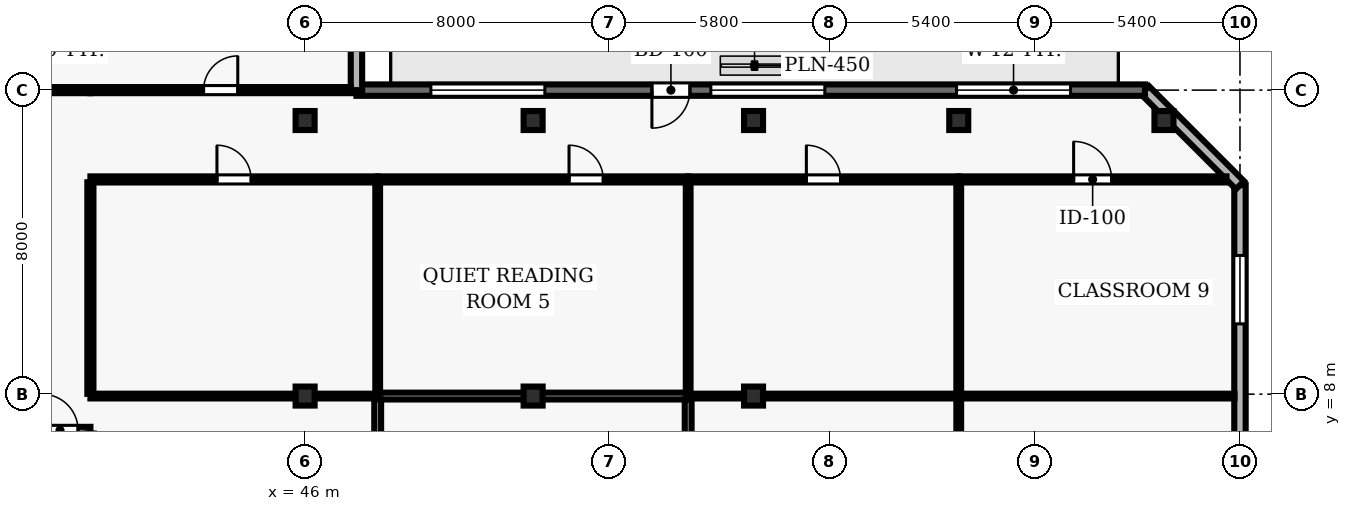
"""IFC4 building model, lengths in metres.
Left out: names, types, materials, properties, quantities, classifications, styles, units other than length and angle.
Written with IfcOpenShell. Run it as: python <this file> out.ifc"""

import sys

from ifc_helpers import new_model, si_unit, direction, frame, frame_2d, origin, origin_2d, place, context, subcontext, project, spatial, rectangle, hollow_rectangle, extrude, element, fill, save


model = new_model("IFC4")
c1 = context("Model", 3, precision=1e-05, world=origin(), true_north=direction((0.0, 1.0)))
c2 = subcontext(c1, "Body", "Model", "MODEL_VIEW")
j1 = project(units=[si_unit("LENGTHUNIT", "METRE"), si_unit("PLANEANGLEUNIT", "RADIAN")], contexts=[c1])
p1 = place(None, origin())
s1 = spatial("IfcSite", under=j1, at=p1, CompositionType="ELEMENT")
p2 = place(p1, origin())
s2 = spatial("IfcBuilding", under=s1, at=p2, CompositionType="ELEMENT")
p3 = place(p2, frame((0.0, 0.0, 130.7)))
s3 = spatial("IfcBuildingStorey", under=s2, at=p3, CompositionType="ELEMENT", Elevation=130.7)
for number, where, z_axis, x_axis in (
    (1, (46.0, 7.95, 0.0), (0.0, 0.0, 1.0), (1.0, 0.0, 0.0)),
    (2, (46.0, 15.2, 0.0), (0.0, 0.0, 1.0), (1.0, 0.0, 0.0)),
    (3, (52.0, 7.95, 0.0), (0.0, 0.0, 1.0), (1.0, 0.0, 0.0)),
    (4, (52.0, 15.2, 0.0), (0.0, 0.0, 1.0), (1.0, 0.0, 0.0)),
    (5, (57.8, 7.95, 0.0), (0.0, 0.0, 1.0), (1.0, 0.0, 0.0)),
    (6, (57.8, 15.2, 0.0), (0.0, 0.0, 1.0), (1.0, 0.0, 0.0)),
    (7, (63.2, 15.2, 0.0), (0.0, 0.0, 1.0), (1.0, 0.0, 0.0)),
    (8, (68.6, 15.2, 0.0), (0.0, 0.0, 1.0), (1.0, 0.0, 0.0)),
):
    element("IfcColumn", number, at=place(p3, frame(where, z_axis=z_axis, x_axis=x_axis)), inside=s3, PredefinedType="COLUMN", context=c2, shape_type="SweptSolid", body=[
        extrude(hollow_rectangle(XDim=0.5, YDim=0.5, WallThickness=0.025, at=origin_2d()), origin(), (0.0, 0.0, 1.0), 3.9),
    ])
p4 = place(p3, frame((70.6, 2.5, 0.0), z_axis=(0.0, 0.0, 1.0), x_axis=(0.0, 1.0, 0.0)))
e9 = element("IfcWall", 9, at=p4, inside=s3, PredefinedType="SOLIDWALL", context=c2, shape_type="SweptSolid", body=[
    extrude(rectangle(XDim=11.0, YDim=0.3, at=frame_2d((5.5, 0.0))), origin(), (0.0, 0.0, 1.0), 3.69),
])
p5 = place(p4, frame((1.85, 0.0, 0.9)))
e10 = element("IfcOpeningElement", 10, at=p5, cuts=e9, PredefinedType="OPENING", context=c2, shape_type="SweptSolid", body=[
    extrude(rectangle(XDim=1.8, YDim=2.2, at=frame_2d((0.9, 1.1))), frame((0.0, 0.16, 0.0), z_axis=(0.0, -1.0, 0.0), x_axis=(1.0, 0.0, 0.0)), (0.0, 0.0, 1.0), 0.32),
])
p6 = place(p4, frame((7.35, 0.0, 0.9)))
e11 = element("IfcOpeningElement", 11, at=p6, cuts=e9, PredefinedType="OPENING", context=c2, shape_type="SweptSolid", body=[
    extrude(rectangle(XDim=1.8, YDim=2.2, at=frame_2d((0.9, 1.1))), frame((0.0, 0.16, 0.0), z_axis=(0.0, -1.0, 0.0), x_axis=(1.0, 0.0, 0.0)), (0.0, 0.0, 1.0), 0.32),
])
p7 = place(p3, frame((70.6, 13.5, 0.0), z_axis=(0.0, 0.0, 1.0), x_axis=(-0.707106781187, 0.707106781187, 0.0)))
e12 = element("IfcWall", 12, at=p7, inside=s3, PredefinedType="SOLIDWALL", context=c2, shape_type="SweptSolid", body=[
    extrude(rectangle(XDim=3.536, YDim=0.3, at=frame_2d((1.768, 0.0))), origin(), (0.0, 0.0, 1.0), 3.69),
])
p8 = place(p3, frame((68.1, 16.0, 0.0), z_axis=(0.0, 0.0, 1.0), x_axis=(-1.0, 0.0, 0.0)))
e13 = element("IfcWall", 13, at=p8, inside=s3, PredefinedType="SOLIDWALL", context=c2, shape_type="SweptSolid", body=[
    extrude(rectangle(XDim=20.749, YDim=0.3, at=frame_2d((10.375, 0.0))), origin(), (0.0, 0.0, 1.0), 3.69),
])
p9 = place(p8, frame((11.974, 0.0, 0.0)))
e14 = element("IfcOpeningElement", 14, at=p9, cuts=e13, PredefinedType="OPENING", context=c2, shape_type="SweptSolid", body=[
    extrude(rectangle(XDim=1.0, YDim=2.2, at=frame_2d((0.5, 1.1))), frame((0.0, 0.16, 0.0), z_axis=(0.0, -1.0, 0.0), x_axis=(1.0, 0.0, 0.0)), (0.0, 0.0, 1.0), 0.32),
])
p10 = place(p8, frame((1.958, 0.0, 0.9)))
e15 = element("IfcOpeningElement", 15, at=p10, cuts=e13, PredefinedType="OPENING", context=c2, shape_type="SweptSolid", body=[
    extrude(rectangle(XDim=3.0, YDim=2.2, at=frame_2d((1.5, 1.1))), frame((0.0, 0.16, 0.0), z_axis=(0.0, -1.0, 0.0), x_axis=(1.0, 0.0, 0.0)), (0.0, 0.0, 1.0), 0.32),
])
p11 = place(p8, frame((8.424, 0.0, 0.9)))
e16 = element("IfcOpeningElement", 16, at=p11, cuts=e13, PredefinedType="OPENING", context=c2, shape_type="SweptSolid", body=[
    extrude(rectangle(XDim=3.0, YDim=2.2, at=frame_2d((1.5, 1.1))), frame((0.0, 0.16, 0.0), z_axis=(0.0, -1.0, 0.0), x_axis=(1.0, 0.0, 0.0)), (0.0, 0.0, 1.0), 0.32),
])
p12 = place(p8, frame((15.791, 0.0, 0.9)))
e17 = element("IfcOpeningElement", 17, at=p12, cuts=e13, PredefinedType="OPENING", context=c2, shape_type="SweptSolid", body=[
    extrude(rectangle(XDim=3.0, YDim=2.2, at=frame_2d((1.5, 1.1))), frame((0.0, 0.16, 0.0), z_axis=(0.0, -1.0, 0.0), x_axis=(1.0, 0.0, 0.0)), (0.0, 0.0, 1.0), 0.32),
])
p13 = place(p3, frame((47.351, 16.0, 0.0), z_axis=(0.0, 0.0, 1.0), x_axis=(0.0, 1.0, 0.0)))
e18 = element("IfcWall", 18, at=p13, inside=s3, PredefinedType="SOLIDWALL", context=c2, shape_type="SweptSolid", body=[
    extrude(rectangle(XDim=10.7, YDim=0.3, at=frame_2d((5.35, 0.0))), origin(), (0.0, 0.0, 1.0), 3.69),
])
p14 = place(p13, frame((4.75, 0.0, 0.9)))
e19 = element("IfcOpeningElement", 19, at=p14, cuts=e18, PredefinedType="OPENING", context=c2, shape_type="SweptSolid", body=[
    extrude(rectangle(XDim=1.2, YDim=1.6, at=frame_2d((0.6, 0.8))), frame((0.0, 0.16, 0.0), z_axis=(0.0, -1.0, 0.0), x_axis=(1.0, 0.0, 0.0)), (0.0, 0.0, 1.0), 0.32),
])
p15 = place(p3, frame((38.05, 7.05, 0.0), z_axis=(0.0, 0.0, 1.0), x_axis=(1.0, 0.0, 0.0)))
e20 = element("IfcWall", 20, at=p15, inside=s3, PredefinedType="PARTITIONING", context=c2, shape_type="SweptSolid", body=[
    extrude(rectangle(XDim=2.3, YDim=0.18, at=frame_2d((1.15, 0.0))), origin(), (0.0, 0.0, 1.0), 3.69),
])
p16 = place(p15, frame((1.025, 0.0, 0.0)))
e21 = element("IfcOpeningElement", 21, at=p16, cuts=e20, PredefinedType="OPENING", context=c2, shape_type="SweptSolid", body=[
    extrude(rectangle(XDim=0.95, YDim=2.1, at=frame_2d((0.475, 1.05))), frame((0.0, 0.1, 0.0), z_axis=(0.0, -1.0, 0.0), x_axis=(1.0, 0.0, 0.0)), (0.0, 0.0, 1.0), 0.2),
])
p17 = place(p3, frame((40.35, 13.65, 0.0), z_axis=(0.0, 0.0, 1.0), x_axis=(1.0, 0.0, 0.0)))
e22 = element("IfcWall", 22, at=p17, inside=s3, PredefinedType="PARTITIONING", context=c2, shape_type="SweptSolid", body=[
    extrude(rectangle(XDim=7.56, YDim=0.16, at=frame_2d((3.78, 0.0))), origin(), (0.0, 0.0, 1.0), 3.69),
])
p18 = place(p17, frame((3.33, 0.0, 0.0)))
e23 = element("IfcOpeningElement", 23, at=p18, cuts=e22, PredefinedType="OPENING", context=c2, shape_type="SweptSolid", body=[
    extrude(rectangle(XDim=0.9, YDim=2.1, at=frame_2d((0.45, 1.05))), frame((0.0, 0.09, 0.0), z_axis=(0.0, -1.0, 0.0), x_axis=(1.0, 0.0, 0.0)), (0.0, 0.0, 1.0), 0.18),
])
p19 = place(p3, frame((40.35, 16.0, 0.0), z_axis=(0.0, 0.0, 1.0), x_axis=(-1.0, 0.0, 0.0)))
e24 = element("IfcWall", 24, at=p19, inside=s3, PredefinedType="PARTITIONING", context=c2, shape_type="SweptSolid", body=[
    extrude(rectangle(XDim=2.3, YDim=0.16, at=frame_2d((1.15, 0.0))), origin(), (0.0, 0.0, 1.0), 3.69),
])
p20 = place(p3, frame((40.35, 16.0, 0.0), z_axis=(0.0, 0.0, 1.0), x_axis=(1.0, 0.0, 0.0)))
e25 = element("IfcWall", 25, at=p20, inside=s3, PredefinedType="PARTITIONING", context=c2, shape_type="SweptSolid", body=[
    extrude(rectangle(XDim=6.856, YDim=0.16, at=frame_2d((3.428, 0.0))), origin(), (0.0, 0.0, 1.0), 3.39),
])
p21 = place(p20, frame((2.978, 0.0, 0.0)))
e26 = element("IfcOpeningElement", 26, at=p21, cuts=e25, PredefinedType="OPENING", context=c2, shape_type="SweptSolid", body=[
    extrude(rectangle(XDim=0.9, YDim=2.1, at=frame_2d((0.45, 1.05))), frame((0.0, 0.09, 0.0), z_axis=(0.0, -1.0, 0.0), x_axis=(1.0, 0.0, 0.0)), (0.0, 0.0, 1.0), 0.18),
])
p22 = place(p3, frame((47.91, 7.95, 0.0), z_axis=(0.0, 0.0, 1.0), x_axis=(-1.0, 0.0, 0.0)))
e27 = element("IfcWall", 27, at=p22, inside=s3, PredefinedType="PARTITIONING", context=c2, shape_type="SweptSolid", body=[
    extrude(rectangle(XDim=7.56, YDim=0.125, at=frame_2d((3.78, 0.0))), origin(), (0.0, 0.0, 1.0), 3.073),
])
p23 = place(p3, frame((47.91, 13.65, 0.0), z_axis=(0.0, 0.0, 1.0), x_axis=(1.0, 0.0, 0.0)))
e28 = element("IfcWall", 28, at=p23, inside=s3, PredefinedType="PARTITIONING", context=c2, shape_type="SweptSolid", body=[
    extrude(rectangle(XDim=8.17, YDim=0.16, at=frame_2d((4.085, 0.0))), origin(), (0.0, 0.0, 1.0), 3.69),
])
p24 = place(p23, frame((5.035, 0.0, 0.0)))
e29 = element("IfcOpeningElement", 29, at=p24, cuts=e28, PredefinedType="OPENING", context=c2, shape_type="SweptSolid", body=[
    extrude(rectangle(XDim=0.9, YDim=2.1, at=frame_2d((0.45, 1.05))), frame((0.0, 0.09, 0.0), z_axis=(0.0, -1.0, 0.0), x_axis=(1.0, 0.0, 0.0)), (0.0, 0.0, 1.0), 0.18),
])
p25 = place(p3, frame((56.08, 7.95, 0.0), z_axis=(0.0, 0.0, 1.0), x_axis=(-1.0, 0.0, 0.0)))
e30 = element("IfcWall", 30, at=p25, inside=s3, PredefinedType="PARTITIONING", context=c2, shape_type="SweptSolid", body=[
    extrude(rectangle(XDim=8.17, YDim=0.18, at=frame_2d((4.085, 0.0))), origin(), (0.0, 0.0, 1.0), 3.073),
])
p26 = place(p3, frame((56.08, 13.65, 0.0), z_axis=(0.0, 0.0, 1.0), x_axis=(1.0, 0.0, 0.0)))
e31 = element("IfcWall", 31, at=p26, inside=s3, PredefinedType="PARTITIONING", context=c2, shape_type="SweptSolid", body=[
    extrude(rectangle(XDim=7.12, YDim=0.16, at=frame_2d((3.56, 0.0))), origin(), (0.0, 0.0, 1.0), 3.69),
])
p27 = place(p26, frame((3.11, 0.0, 0.0)))
e32 = element("IfcOpeningElement", 32, at=p27, cuts=e31, PredefinedType="OPENING", context=c2, shape_type="SweptSolid", body=[
    extrude(rectangle(XDim=0.9, YDim=2.1, at=frame_2d((0.45, 1.05))), frame((0.0, 0.09, 0.0), z_axis=(0.0, -1.0, 0.0), x_axis=(1.0, 0.0, 0.0)), (0.0, 0.0, 1.0), 0.18),
])
p28 = place(p3, frame((63.2, 7.95, 0.0), z_axis=(0.0, 0.0, 1.0), x_axis=(-1.0, 0.0, 0.0)))
e33 = element("IfcWall", 33, at=p28, inside=s3, PredefinedType="PARTITIONING", context=c2, shape_type="SweptSolid", body=[
    extrude(rectangle(XDim=7.12, YDim=0.125, at=frame_2d((3.56, 0.0))), origin(), (0.0, 0.0, 1.0), 3.073),
])
p29 = place(p3, frame((63.2, 13.65, 0.0), z_axis=(0.0, 0.0, 1.0), x_axis=(1.0, 0.0, 0.0)))
e34 = element("IfcWall", 34, at=p29, inside=s3, PredefinedType="PARTITIONING", context=c2, shape_type="SweptSolid", body=[
    extrude(rectangle(XDim=7.045, YDim=0.16, at=frame_2d((3.522, 0.0))), origin(), (0.0, 0.0, 1.0), 3.69),
])
p30 = place(p29, frame((3.023, 0.0, 0.0)))
e35 = element("IfcOpeningElement", 35, at=p30, cuts=e34, PredefinedType="OPENING", context=c2, shape_type="SweptSolid", body=[
    extrude(rectangle(XDim=1.0, YDim=2.1, at=frame_2d((0.5, 1.05))), frame((0.0, 0.09, 0.0), z_axis=(0.0, -1.0, 0.0), x_axis=(1.0, 0.0, 0.0)), (0.0, 0.0, 1.0), 0.18),
])
p31 = place(p3, frame((70.455, 7.95, 0.0), z_axis=(0.0, 0.0, 1.0), x_axis=(-1.0, 0.0, 0.0)))
e36 = element("IfcWall", 36, at=p31, inside=s3, PredefinedType="PARTITIONING", context=c2, shape_type="SweptSolid", body=[
    extrude(rectangle(XDim=7.255, YDim=0.125, at=frame_2d((3.627, 0.0))), origin(), (0.0, 0.0, 1.0), 3.69),
])
p32 = place(p3, frame((40.35, 8.008, 0.0), z_axis=(0.0, 0.0, 1.0), x_axis=(0.0, 1.0, 0.0)))
e37 = element("IfcWall", 37, at=p32, inside=s3, PredefinedType="PARTITIONING", context=c2, shape_type="SweptSolid", body=[
    extrude(rectangle(XDim=5.567, YDim=0.16, at=frame_2d((2.783, 0.0))), origin(), (0.0, 0.0, 1.0), 3.69),
])
p33 = place(p3, frame((47.91, 0.145, 0.0), z_axis=(0.0, 0.0, 1.0), x_axis=(0.0, 1.0, 0.0)))
e38 = element("IfcWall", 38, at=p33, inside=s3, PredefinedType="PARTITIONING", context=c2, shape_type="SweptSolid", body=[
    extrude(rectangle(XDim=7.72, YDim=0.18, at=frame_2d((3.86, 0.0))), origin(), (0.0, 0.0, 1.0), 3.69),
])
p34 = place(p33, frame((3.385, 0.0, 0.0)))
e39 = element("IfcOpeningElement", 39, at=p34, cuts=e38, PredefinedType="OPENING", context=c2, shape_type="SweptSolid", body=[
    extrude(rectangle(XDim=0.95, YDim=2.1, at=frame_2d((0.475, 1.05))), frame((0.0, 0.1, 0.0), z_axis=(0.0, -1.0, 0.0), x_axis=(1.0, 0.0, 0.0)), (0.0, 0.0, 1.0), 0.2),
])
p35 = place(p3, frame((47.91, 8.035, 0.0), z_axis=(0.0, 0.0, 1.0), x_axis=(0.0, 1.0, 0.0)))
e40 = element("IfcWall", 40, at=p35, inside=s3, PredefinedType="PARTITIONING", context=c2, shape_type="SweptSolid", body=[
    extrude(rectangle(XDim=5.54, YDim=0.125, at=frame_2d((2.77, 0.0))), origin(), (0.0, 0.0, 1.0), 3.69),
])
p36 = place(p3, frame((56.08, 0.145, 0.0), z_axis=(0.0, 0.0, 1.0), x_axis=(0.0, 1.0, 0.0)))
e41 = element("IfcWall", 41, at=p36, inside=s3, PredefinedType="PARTITIONING", context=c2, shape_type="SweptSolid", body=[
    extrude(rectangle(XDim=7.72, YDim=0.18, at=frame_2d((3.86, 0.0))), origin(), (0.0, 0.0, 1.0), 3.69),
])
p37 = place(p36, frame((3.41, 0.0, 0.0)))
e42 = element("IfcOpeningElement", 42, at=p37, cuts=e41, PredefinedType="OPENING", context=c2, shape_type="SweptSolid", body=[
    extrude(rectangle(XDim=0.9, YDim=2.1, at=frame_2d((0.45, 1.05))), frame((0.0, 0.1, 0.0), z_axis=(0.0, -1.0, 0.0), x_axis=(1.0, 0.0, 0.0)), (0.0, 0.0, 1.0), 0.2),
])
p38 = place(p3, frame((56.08, 8.035, 0.0), z_axis=(0.0, 0.0, 1.0), x_axis=(0.0, 1.0, 0.0)))
e43 = element("IfcWall", 43, at=p38, inside=s3, PredefinedType="PARTITIONING", context=c2, shape_type="SweptSolid", body=[
    extrude(rectangle(XDim=5.54, YDim=0.125, at=frame_2d((2.77, 0.0))), origin(), (0.0, 0.0, 1.0), 3.69),
])
p39 = place(p3, frame((63.2, 0.145, 0.0), z_axis=(0.0, 0.0, 1.0), x_axis=(0.0, 1.0, 0.0)))
e44 = element("IfcWall", 44, at=p39, inside=s3, PredefinedType="PARTITIONING", context=c2, shape_type="SweptSolid", body=[
    extrude(rectangle(XDim=7.748, YDim=0.125, at=frame_2d((3.874, 0.0))), origin(), (0.0, 0.0, 1.0), 3.073),
])
p40 = place(p39, frame((3.424, 0.0, 0.0)))
e45 = element("IfcOpeningElement", 45, at=p40, cuts=e44, PredefinedType="OPENING", context=c2, shape_type="SweptSolid", body=[
    extrude(rectangle(XDim=0.9, YDim=2.1, at=frame_2d((0.45, 1.05))), frame((0.0, 0.073, 0.0), z_axis=(0.0, -1.0, 0.0), x_axis=(1.0, 0.0, 0.0)), (0.0, 0.0, 1.0), 0.145),
])
p41 = place(p3, frame((63.2, 8.008, 0.0), z_axis=(0.0, 0.0, 1.0), x_axis=(0.0, 1.0, 0.0)))
e46 = element("IfcWall", 46, at=p41, inside=s3, PredefinedType="PARTITIONING", context=c2, shape_type="SweptSolid", body=[
    extrude(rectangle(XDim=5.567, YDim=0.125, at=frame_2d((2.783, 0.0))), origin(), (0.0, 0.0, 1.0), 3.073),
])
p42 = place(p6, origin())
e47 = element("IfcWindow", 47, at=p42, inside=s3, PartitioningType="SINGLE_PANEL", PredefinedType="WINDOW", context=c2, shape_type="SweptSolid", body=[
    extrude(rectangle(XDim=1.8, YDim=2.2, at=frame_2d((0.9, 1.1))), frame((0.0, 0.03, 0.0), z_axis=(0.0, -1.0, 0.0), x_axis=(1.0, 0.0, 0.0)), (0.0, 0.0, 1.0), 0.06),
])
fill(e11, e47)
p43 = place(p9, origin())
e48 = element("IfcDoor", 48, at=p43, inside=s3, OperationType="SINGLE_SWING_RIGHT", PredefinedType="DOOR", context=c2, shape_type="SweptSolid", body=[
    extrude(rectangle(XDim=1.0, YDim=2.2, at=frame_2d((0.5, 1.1))), frame((0.0, 0.025, 0.0), z_axis=(0.0, -1.0, 0.0), x_axis=(1.0, 0.0, 0.0)), (0.0, 0.0, 1.0), 0.05),
])
fill(e14, e48)
p44 = place(p10, origin())
e49 = element("IfcWindow", 49, at=p44, inside=s3, PartitioningType="SINGLE_PANEL", PredefinedType="WINDOW", context=c2, shape_type="SweptSolid", body=[
    extrude(rectangle(XDim=3.0, YDim=2.2, at=frame_2d((1.5, 1.1))), frame((0.0, 0.03, 0.0), z_axis=(0.0, -1.0, 0.0), x_axis=(1.0, 0.0, 0.0)), (0.0, 0.0, 1.0), 0.06),
])
fill(e15, e49)
p45 = place(p11, origin())
e50 = element("IfcWindow", 50, at=p45, inside=s3, PartitioningType="SINGLE_PANEL", PredefinedType="WINDOW", context=c2, shape_type="SweptSolid", body=[
    extrude(rectangle(XDim=3.0, YDim=2.2, at=frame_2d((1.5, 1.1))), frame((0.0, 0.03, 0.0), z_axis=(0.0, -1.0, 0.0), x_axis=(1.0, 0.0, 0.0)), (0.0, 0.0, 1.0), 0.06),
])
fill(e16, e50)
p46 = place(p12, origin())
e51 = element("IfcWindow", 51, at=p46, inside=s3, PartitioningType="SINGLE_PANEL", PredefinedType="WINDOW", context=c2, shape_type="SweptSolid", body=[
    extrude(rectangle(XDim=3.0, YDim=2.2, at=frame_2d((1.5, 1.1))), frame((0.0, 0.03, 0.0), z_axis=(0.0, -1.0, 0.0), x_axis=(1.0, 0.0, 0.0)), (0.0, 0.0, 1.0), 0.06),
])
fill(e17, e51)
p47 = place(p16, origin())
e52 = element("IfcDoor", 52, at=p47, inside=s3, OperationType="SINGLE_SWING_LEFT", PredefinedType="DOOR", context=c2, shape_type="SweptSolid", body=[
    extrude(rectangle(XDim=0.95, YDim=2.1, at=frame_2d((0.475, 1.05))), frame((0.0, 0.025, 0.0), z_axis=(0.0, -1.0, 0.0), x_axis=(1.0, 0.0, 0.0)), (0.0, 0.0, 1.0), 0.05),
])
fill(e21, e52)
p48 = place(p18, origin())
e53 = element("IfcDoor", 53, at=p48, inside=s3, OperationType="SINGLE_SWING_LEFT", PredefinedType="DOOR", context=c2, shape_type="SweptSolid", body=[
    extrude(rectangle(XDim=0.9, YDim=2.1, at=frame_2d((0.45, 1.05))), frame((0.0, 0.025, 0.0), z_axis=(0.0, -1.0, 0.0), x_axis=(1.0, 0.0, 0.0)), (0.0, 0.0, 1.0), 0.05),
])
fill(e23, e53)
p49 = place(p24, origin())
e54 = element("IfcDoor", 54, at=p49, inside=s3, OperationType="SINGLE_SWING_LEFT", PredefinedType="DOOR", context=c2, shape_type="SweptSolid", body=[
    extrude(rectangle(XDim=0.9, YDim=2.1, at=frame_2d((0.45, 1.05))), frame((0.0, 0.025, 0.0), z_axis=(0.0, -1.0, 0.0), x_axis=(1.0, 0.0, 0.0)), (0.0, 0.0, 1.0), 0.05),
])
fill(e29, e54)
p50 = place(p27, origin())
e55 = element("IfcDoor", 55, at=p50, inside=s3, OperationType="SINGLE_SWING_LEFT", PredefinedType="DOOR", context=c2, shape_type="SweptSolid", body=[
    extrude(rectangle(XDim=0.9, YDim=2.1, at=frame_2d((0.45, 1.05))), frame((0.0, 0.025, 0.0), z_axis=(0.0, -1.0, 0.0), x_axis=(1.0, 0.0, 0.0)), (0.0, 0.0, 1.0), 0.05),
])
fill(e32, e55)
p51 = place(p30, origin())
e56 = element("IfcDoor", 56, at=p51, inside=s3, OperationType="SINGLE_SWING_LEFT", PredefinedType="DOOR", context=c2, shape_type="SweptSolid", body=[
    extrude(rectangle(XDim=1.0, YDim=2.1, at=frame_2d((0.5, 1.05))), frame((0.0, 0.025, 0.0), z_axis=(0.0, -1.0, 0.0), x_axis=(1.0, 0.0, 0.0)), (0.0, 0.0, 1.0), 0.05),
])
fill(e35, e56)
p52 = place(p21, origin())
e57 = element("IfcDoor", 57, at=p52, inside=s3, OperationType="SINGLE_SWING_RIGHT", PredefinedType="DOOR", context=c2, shape_type="SweptSolid", body=[
    extrude(rectangle(XDim=0.9, YDim=2.1, at=frame_2d((0.45, 1.05))), frame((0.0, 0.025, 0.0), z_axis=(0.0, -1.0, 0.0), x_axis=(1.0, 0.0, 0.0)), (0.0, 0.0, 1.0), 0.05),
])
fill(e26, e57)
save(model, sys.argv[1])
